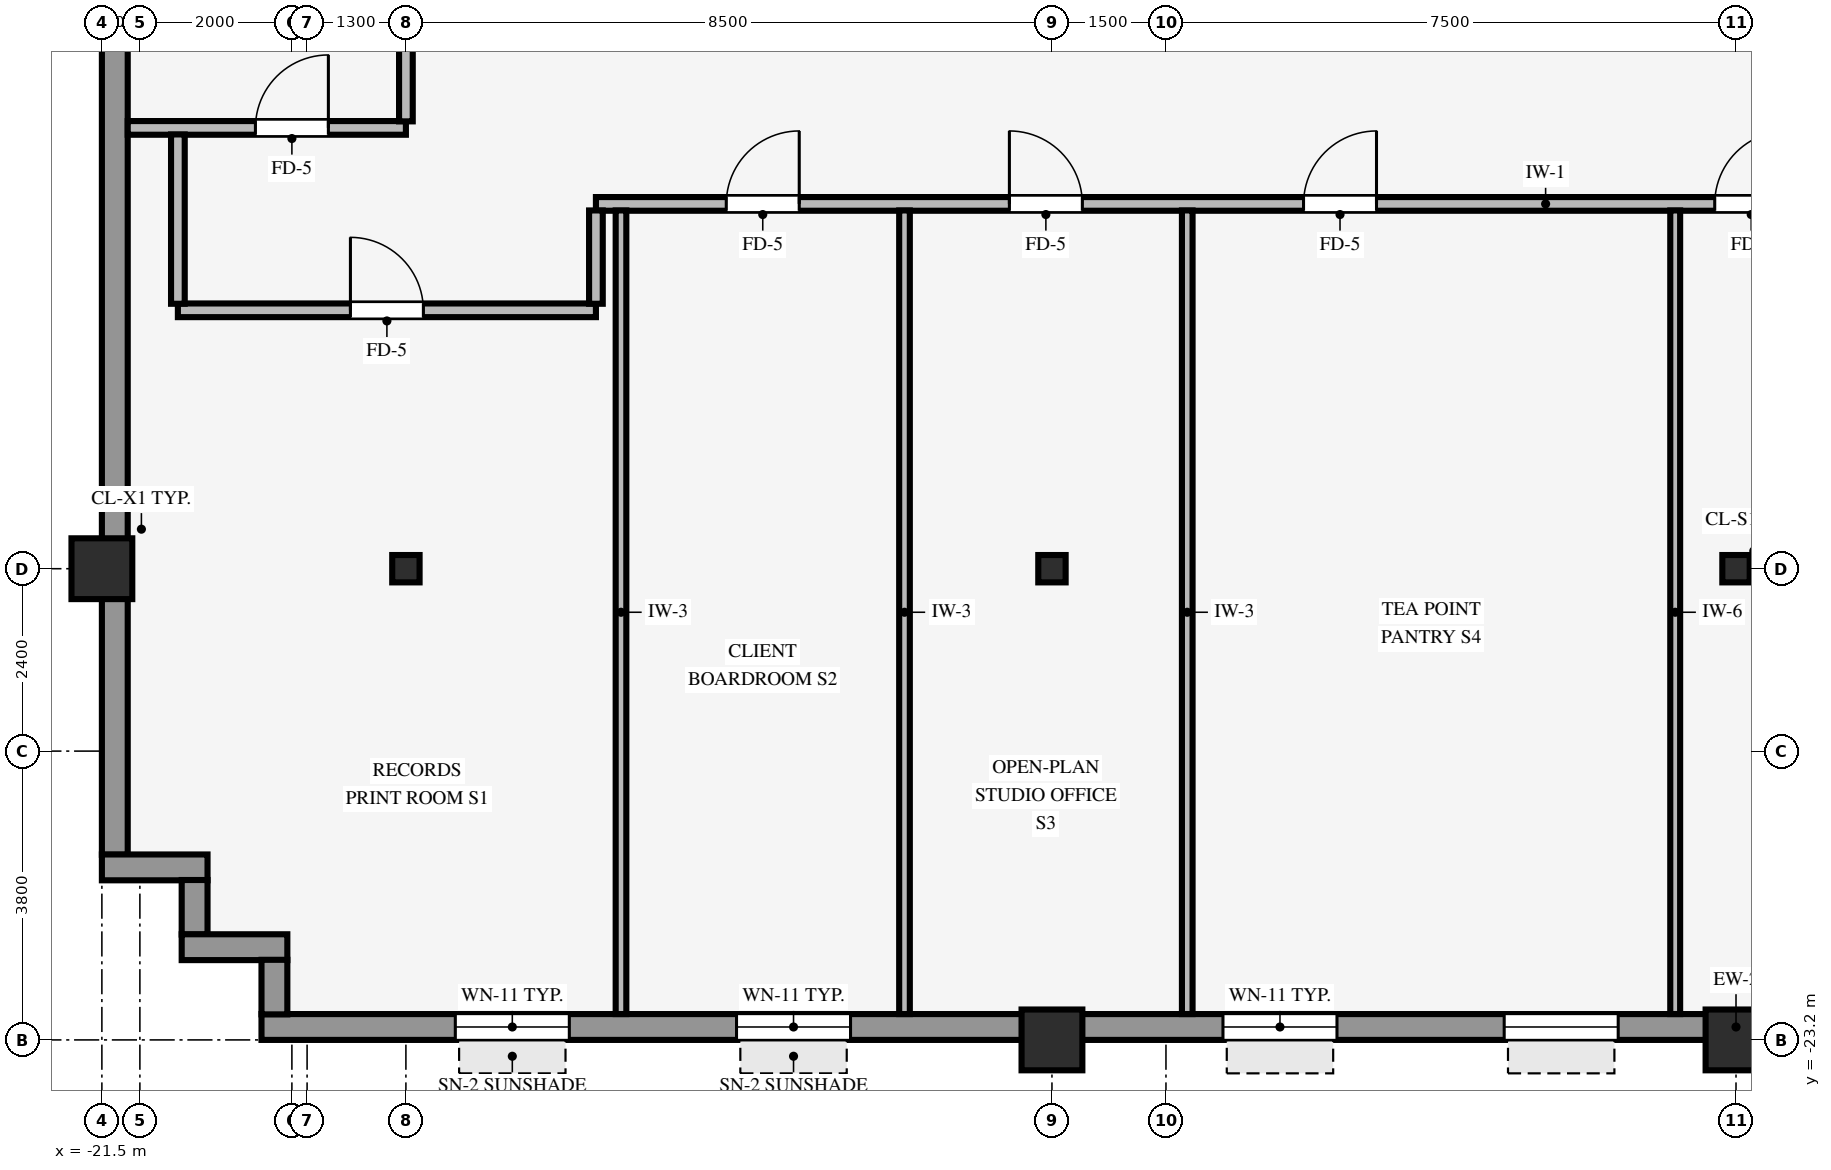
"""IFC4 building model, lengths in metres.
Left out: names, types, materials, properties, quantities, classifications, styles, units other than length and angle.
Written with IfcOpenShell. Run it as: python <this file> out.ifc"""

import sys

from ifc_helpers import new_model, si_unit, direction, frame, frame_2d, origin, origin_2d, place, context, subcontext, project, spatial, rectangle, hollow_rectangle, i_section, extrude, source, transform, mapped, element, fill, save


model = new_model("IFC4")
c1 = context("Model", 3, precision=1e-05, world=origin(), true_north=direction((0.0, 1.0)))
c2 = subcontext(c1, "Body", "Model", "MODEL_VIEW")
j1 = project(units=[si_unit("LENGTHUNIT", "METRE"), si_unit("PLANEANGLEUNIT", "RADIAN")], contexts=[c1])
p1 = place(None, origin())
s1 = spatial("IfcSite", under=j1, at=p1, CompositionType="ELEMENT")
p2 = place(p1, origin())
s2 = spatial("IfcBuilding", under=s1, at=p2, CompositionType="ELEMENT")
p3 = place(p2, frame((0.0, 0.0, 64.1)))
s3 = spatial("IfcBuildingStorey", under=s2, at=p3, CompositionType="ELEMENT", Elevation=64.1)
for number, where, z_axis, x_axis in (
    (1, (-21.5, -17.0, 0.0), (0.0, 0.0, 1.0), (1.0, 0.0, 0.0)),
    (2, (-9.0, -23.2, 0.0), (0.0, 0.0, 1.0), (1.0, 0.0, 0.0)),
    (3, (0.0, -23.2, 0.0), (0.0, 0.0, 1.0), (1.0, 0.0, 0.0)),
):
    element("IfcColumn", number, at=place(p3, frame(where, z_axis=z_axis, x_axis=x_axis)), inside=s3, PredefinedType="COLUMN", context=c2, shape_type="SweptSolid", body=[
        extrude(hollow_rectangle(XDim=0.8, YDim=0.8, WallThickness=0.055, InnerFilletRadius=0.055, OuterFilletRadius=0.11, at=origin_2d()), origin(), (0.0, 0.0, 1.0), 3.37),
    ])
for number, where, z_axis, x_axis in (
    (4, (0.0, -17.0, 0.0), (0.0, 0.0, 1.0), (1.0, 0.0, 0.0)),
    (5, (-17.5, -17.0, 0.0), (0.0, 0.0, 1.0), (1.0, 0.0, 0.0)),
    (6, (-9.0, -17.0, 0.0), (0.0, 0.0, 1.0), (1.0, 0.0, 0.0)),
):
    element("IfcColumn", number, at=place(p3, frame(where, z_axis=z_axis, x_axis=x_axis)), inside=s3, PredefinedType="COLUMN", context=c2, shape_type="SweptSolid", body=[
        extrude(i_section(OverallWidth=0.36, OverallDepth=0.36, WebThickness=0.021, FlangeThickness=0.021, FilletRadius=0.018, at=origin_2d()), origin(), (0.0, 0.0, 1.0), 3.37),
    ])
p4 = place(p3, frame((-19.4, -23.03, 0.0), z_axis=(0.0, 0.0, 1.0), x_axis=(1.0, 0.0, 0.0)))
e7 = element("IfcWall", 7, at=p4, inside=s3, PredefinedType="STANDARD", context=c2, shape_type="SweptSolid", body=[
    extrude(rectangle(XDim=38.8, YDim=0.34, at=frame_2d((19.4, 0.0))), origin(), (0.0, 0.0, 1.0), 2.705),
])
p5 = place(p4, frame((2.55, 0.0, 0.8)))
e8 = element("IfcOpeningElement", 8, at=p5, cuts=e7, PredefinedType="OPENING", context=c2, shape_type="SweptSolid", body=[
    extrude(rectangle(XDim=1.5, YDim=1.6, at=frame_2d((0.75, 0.8))), frame((0.0, 0.18, 0.0), z_axis=(0.0, -1.0, 0.0), x_axis=(1.0, 0.0, 0.0)), (0.0, 0.0, 1.0), 0.36),
])
p6 = place(p4, frame((6.25, 0.0, 0.8)))
e9 = element("IfcOpeningElement", 9, at=p6, cuts=e7, PredefinedType="OPENING", context=c2, shape_type="SweptSolid", body=[
    extrude(rectangle(XDim=1.5, YDim=1.6, at=frame_2d((0.75, 0.8))), frame((0.0, 0.18, 0.0), z_axis=(0.0, -1.0, 0.0), x_axis=(1.0, 0.0, 0.0)), (0.0, 0.0, 1.0), 0.36),
])
p7 = place(p4, frame((12.65, 0.0, 0.8)))
e10 = element("IfcOpeningElement", 10, at=p7, cuts=e7, PredefinedType="OPENING", context=c2, shape_type="SweptSolid", body=[
    extrude(rectangle(XDim=1.5, YDim=1.6, at=frame_2d((0.75, 0.8))), frame((0.0, 0.18, 0.0), z_axis=(0.0, -1.0, 0.0), x_axis=(1.0, 0.0, 0.0)), (0.0, 0.0, 1.0), 0.36),
])
p8 = place(p4, frame((16.35, 0.0, 0.8)))
e11 = element("IfcOpeningElement", 11, at=p8, cuts=e7, PredefinedType="OPENING", context=c2, shape_type="SweptSolid", body=[
    extrude(rectangle(XDim=1.5, YDim=1.6, at=frame_2d((0.75, 0.8))), frame((0.0, 0.18, 0.0), z_axis=(0.0, -1.0, 0.0), x_axis=(1.0, 0.0, 0.0)), (0.0, 0.0, 1.0), 0.36),
])
p9 = place(p4, frame((20.95, 0.0, 0.8)))
e12 = element("IfcOpeningElement", 12, at=p9, cuts=e7, PredefinedType="OPENING", context=c2, shape_type="SweptSolid", body=[
    extrude(rectangle(XDim=1.5, YDim=1.6, at=frame_2d((0.75, 0.8))), frame((0.0, 0.18, 0.0), z_axis=(0.0, -1.0, 0.0), x_axis=(1.0, 0.0, 0.0)), (0.0, 0.0, 1.0), 0.36),
])
p10 = place(p4, frame((25.55, 0.0, 0.8)))
e13 = element("IfcOpeningElement", 13, at=p10, cuts=e7, PredefinedType="OPENING", context=c2, shape_type="SweptSolid", body=[
    extrude(rectangle(XDim=1.5, YDim=1.6, at=frame_2d((0.75, 0.8))), frame((0.0, 0.18, 0.0), z_axis=(0.0, -1.0, 0.0), x_axis=(1.0, 0.0, 0.0)), (0.0, 0.0, 1.0), 0.36),
])
p11 = place(p4, frame((30.15, 0.0, 0.8)))
e14 = element("IfcOpeningElement", 14, at=p11, cuts=e7, PredefinedType="OPENING", context=c2, shape_type="SweptSolid", body=[
    extrude(rectangle(XDim=1.5, YDim=1.6, at=frame_2d((0.75, 0.8))), frame((0.0, 0.18, 0.0), z_axis=(0.0, -1.0, 0.0), x_axis=(1.0, 0.0, 0.0)), (0.0, 0.0, 1.0), 0.36),
])
p12 = place(p4, frame((34.75, 0.0, 0.8)))
e15 = element("IfcOpeningElement", 15, at=p12, cuts=e7, PredefinedType="OPENING", context=c2, shape_type="SweptSolid", body=[
    extrude(rectangle(XDim=1.5, YDim=1.6, at=frame_2d((0.75, 0.8))), frame((0.0, 0.18, 0.0), z_axis=(0.0, -1.0, 0.0), x_axis=(1.0, 0.0, 0.0)), (0.0, 0.0, 1.0), 0.36),
])
p13 = place(p3, frame((-21.33, -20.764, 0.0), z_axis=(0.0, 0.0, 1.0), x_axis=(0.0, 1.0, 0.0)))
e16 = element("IfcWall", 16, at=p13, inside=s3, PredefinedType="STANDARD", context=c2, shape_type="SweptSolid", body=[
    extrude(rectangle(XDim=41.528, YDim=0.34, at=frame_2d((20.764, 0.0))), origin(), (0.0, 0.0, 1.0), 2.705),
])
p14 = place(p13, frame((15.364, 0.0, 0.0)))
e17 = element("IfcOpeningElement", 17, at=p14, cuts=e16, PredefinedType="OPENING", context=c2, shape_type="SweptSolid", body=[
    extrude(rectangle(XDim=1.05, YDim=2.1, at=frame_2d((0.525, 1.05))), frame((0.0, 0.18, 0.0), z_axis=(0.0, -1.0, 0.0), x_axis=(1.0, 0.0, 0.0)), (0.0, 0.0, 1.0), 0.36),
])
p15 = place(p13, frame((12.202, 0.0, 0.8)))
e18 = element("IfcOpeningElement", 18, at=p15, cuts=e16, PredefinedType="OPENING", context=c2, shape_type="SweptSolid", body=[
    extrude(rectangle(XDim=2.3, YDim=1.62, at=frame_2d((1.15, 0.81))), frame((0.0, 0.18, 0.0), z_axis=(0.0, -1.0, 0.0), x_axis=(1.0, 0.0, 0.0)), (0.0, 0.0, 1.0), 0.36),
])
p16 = place(p13, frame((17.144, 0.0, 0.8)))
e19 = element("IfcOpeningElement", 19, at=p16, cuts=e16, PredefinedType="OPENING", context=c2, shape_type="SweptSolid", body=[
    extrude(rectangle(XDim=2.3, YDim=1.62, at=frame_2d((1.15, 0.81))), frame((0.0, 0.18, 0.0), z_axis=(0.0, -1.0, 0.0), x_axis=(1.0, 0.0, 0.0)), (0.0, 0.0, 1.0), 0.36),
])
p17 = place(p13, frame((27.025, 0.0, 0.8)))
e20 = element("IfcOpeningElement", 20, at=p17, cuts=e16, PredefinedType="OPENING", context=c2, shape_type="SweptSolid", body=[
    extrude(rectangle(XDim=2.3, YDim=1.62, at=frame_2d((1.15, 0.81))), frame((0.0, 0.18, 0.0), z_axis=(0.0, -1.0, 0.0), x_axis=(1.0, 0.0, 0.0)), (0.0, 0.0, 1.0), 0.36),
])
p18 = place(p3, frame((-21.5, -20.93, 0.0), z_axis=(0.0, 0.0, 1.0), x_axis=(1.0, 0.0, 0.0)))
e21 = element("IfcWall", 21, at=p18, inside=s3, PredefinedType="STANDARD", context=c2, shape_type="SweptSolid", body=[
    extrude(rectangle(XDim=1.39, YDim=0.34, at=frame_2d((0.695, 0.0))), origin(), (0.0, 0.0, 1.0), 3.36),
])
p19 = place(p3, frame((-20.28, -21.814, 0.0), z_axis=(0.0, 0.0, 1.0), x_axis=(0.0, 1.0, 0.0)))
e22 = element("IfcWall", 22, at=p19, inside=s3, PredefinedType="STANDARD", context=c2, shape_type="SweptSolid", body=[
    extrude(rectangle(XDim=0.718, YDim=0.34, at=frame_2d((0.359, 0.0))), origin(), (0.0, 0.0, 1.0), 3.36),
])
p20 = place(p3, frame((-20.45, -21.98, 0.0), z_axis=(0.0, 0.0, 1.0), x_axis=(1.0, 0.0, 0.0)))
e23 = element("IfcWall", 23, at=p20, inside=s3, PredefinedType="STANDARD", context=c2, shape_type="SweptSolid", body=[
    extrude(rectangle(XDim=1.39, YDim=0.34, at=frame_2d((0.695, 0.0))), origin(), (0.0, 0.0, 1.0), 3.36),
])
p21 = place(p3, frame((-19.23, -22.864, 0.0), z_axis=(0.0, 0.0, 1.0), x_axis=(0.0, 1.0, 0.0)))
e24 = element("IfcWall", 24, at=p21, inside=s3, PredefinedType="STANDARD", context=c2, shape_type="SweptSolid", body=[
    extrude(rectangle(XDim=0.718, YDim=0.34, at=frame_2d((0.359, 0.0))), origin(), (0.0, 0.0, 1.0), 3.36),
])
p22 = place(p3, frame((-20.5, -13.6, 0.0), z_axis=(0.0, 0.0, 1.0), x_axis=(1.0, 0.0, 0.0)))
e25 = element("IfcWall", 25, at=p22, inside=s3, PredefinedType="PARTITIONING", context=c2, shape_type="SweptSolid", body=[
    extrude(rectangle(XDim=5.5, YDim=0.18, at=frame_2d((2.75, 0.0))), origin(), (0.0, 0.0, 1.0), 2.942),
])
p23 = place(p22, frame((2.27, 0.0, 0.0)))
e26 = element("IfcOpeningElement", 26, at=p23, cuts=e25, PredefinedType="OPENING", context=c2, shape_type="SweptSolid", body=[
    extrude(rectangle(XDim=0.96, YDim=2.1, at=frame_2d((0.48, 1.05))), frame((0.0, 0.1, 0.0), z_axis=(0.0, -1.0, 0.0), x_axis=(1.0, 0.0, 0.0)), (0.0, 0.0, 1.0), 0.2),
])
p24 = place(p3, frame((-15.0, -12.2, 0.0), z_axis=(0.0, 0.0, 1.0), x_axis=(1.0, 0.0, 0.0)))
e27 = element("IfcWall", 27, at=p24, inside=s3, PredefinedType="PARTITIONING", context=c2, shape_type="SweptSolid", body=[
    extrude(rectangle(XDim=23.8, YDim=0.18, at=frame_2d((11.9, 0.0))), origin(), (0.0, 0.0, 1.0), 3.36),
])
p25 = place(p24, frame((9.31, 0.0, 0.0)))
e28 = element("IfcOpeningElement", 28, at=p25, cuts=e27, PredefinedType="OPENING", context=c2, shape_type="SweptSolid", body=[
    extrude(rectangle(XDim=0.96, YDim=2.1, at=frame_2d((0.48, 1.05))), frame((0.0, 0.1, 0.0), z_axis=(0.0, -1.0, 0.0), x_axis=(1.0, 0.0, 0.0)), (0.0, 0.0, 1.0), 0.2),
])
p26 = place(p24, frame((1.715, 0.0, 0.0)))
e29 = element("IfcOpeningElement", 29, at=p26, cuts=e27, PredefinedType="OPENING", context=c2, shape_type="SweptSolid", body=[
    extrude(rectangle(XDim=0.96, YDim=2.1, at=frame_2d((0.48, 1.05))), frame((0.0, 0.1, 0.0), z_axis=(0.0, -1.0, 0.0), x_axis=(1.0, 0.0, 0.0)), (0.0, 0.0, 1.0), 0.2),
])
p27 = place(p24, frame((5.44, 0.0, 0.0)))
e30 = element("IfcOpeningElement", 30, at=p27, cuts=e27, PredefinedType="OPENING", context=c2, shape_type="SweptSolid", body=[
    extrude(rectangle(XDim=0.96, YDim=2.1, at=frame_2d((0.48, 1.05))), frame((0.0, 0.1, 0.0), z_axis=(0.0, -1.0, 0.0), x_axis=(1.0, 0.0, 0.0)), (0.0, 0.0, 1.0), 0.2),
])
p28 = place(p24, frame((19.65, 0.0, 0.0)))
e31 = element("IfcOpeningElement", 31, at=p28, cuts=e27, PredefinedType="OPENING", context=c2, shape_type="SweptSolid", body=[
    extrude(rectangle(XDim=0.9, YDim=2.1, at=frame_2d((0.45, 1.05))), frame((0.0, 0.1, 0.0), z_axis=(0.0, -1.0, 0.0), x_axis=(1.0, 0.0, 0.0)), (0.0, 0.0, 1.0), 0.2),
])
p29 = place(p24, frame((17.05, 0.0, 0.0)))
e32 = element("IfcOpeningElement", 32, at=p29, cuts=e27, PredefinedType="OPENING", context=c2, shape_type="SweptSolid", body=[
    extrude(rectangle(XDim=0.9, YDim=2.1, at=frame_2d((0.45, 1.05))), frame((0.0, 0.1, 0.0), z_axis=(0.0, -1.0, 0.0), x_axis=(1.0, 0.0, 0.0)), (0.0, 0.0, 1.0), 0.2),
])
p30 = place(p24, frame((22.15, 0.0, 0.0)))
e33 = element("IfcOpeningElement", 33, at=p30, cuts=e27, PredefinedType="OPENING", context=c2, shape_type="SweptSolid", body=[
    extrude(rectangle(XDim=0.9, YDim=2.1, at=frame_2d((0.45, 1.05))), frame((0.0, 0.1, 0.0), z_axis=(0.0, -1.0, 0.0), x_axis=(1.0, 0.0, 0.0)), (0.0, 0.0, 1.0), 0.2),
])
p31 = place(p24, frame((14.72, 0.0, 0.0)))
e34 = element("IfcOpeningElement", 34, at=p31, cuts=e27, PredefinedType="OPENING", context=c2, shape_type="SweptSolid", body=[
    extrude(rectangle(XDim=0.96, YDim=2.1, at=frame_2d((0.48, 1.05))), frame((0.0, 0.1, 0.0), z_axis=(0.0, -1.0, 0.0), x_axis=(1.0, 0.0, 0.0)), (0.0, 0.0, 1.0), 0.2),
])
p32 = place(p3, frame((-21.16, -11.2, 0.0), z_axis=(0.0, 0.0, 1.0), x_axis=(1.0, 0.0, 0.0)))
e35 = element("IfcWall", 35, at=p32, inside=s3, PredefinedType="PARTITIONING", context=c2, shape_type="SweptSolid", body=[
    extrude(rectangle(XDim=3.66, YDim=0.18, at=frame_2d((1.83, 0.0))), origin(), (0.0, 0.0, 1.0), 3.36),
])
p33 = place(p32, frame((1.68, 0.0, 0.0)))
e36 = element("IfcOpeningElement", 36, at=p33, cuts=e35, PredefinedType="OPENING", context=c2, shape_type="SweptSolid", body=[
    extrude(rectangle(XDim=0.96, YDim=2.1, at=frame_2d((0.48, 1.05))), frame((0.0, 0.1, 0.0), z_axis=(0.0, -1.0, 0.0), x_axis=(1.0, 0.0, 0.0)), (0.0, 0.0, 1.0), 0.2),
])
p34 = place(p3, frame((-20.5, -13.514, 0.0), z_axis=(0.0, 0.0, 1.0), x_axis=(0.0, 1.0, 0.0)))
e37 = element("IfcWall", 37, at=p34, inside=s3, PredefinedType="PARTITIONING", context=c2, shape_type="SweptSolid", body=[
    extrude(rectangle(XDim=2.228, YDim=0.18, at=frame_2d((1.114, 0.0))), origin(), (0.0, 0.0, 1.0), 3.36),
])
p35 = place(p3, frame((-17.5, -11.114, 0.0), z_axis=(0.0, 0.0, 1.0), x_axis=(0.0, 1.0, 0.0)))
e38 = element("IfcWall", 38, at=p35, inside=s3, PredefinedType="PARTITIONING", context=c2, shape_type="SweptSolid", body=[
    extrude(rectangle(XDim=0.968, YDim=0.18, at=frame_2d((0.484, 0.0))), origin(), (0.0, 0.0, 1.0), 2.738),
])
p36 = place(p3, frame((-15.0, -13.514, 0.0), z_axis=(0.0, 0.0, 1.0), x_axis=(0.0, 1.0, 0.0)))
e39 = element("IfcWall", 39, at=p36, inside=s3, PredefinedType="PARTITIONING", context=c2, shape_type="SweptSolid", body=[
    extrude(rectangle(XDim=1.228, YDim=0.18, at=frame_2d((0.614, 0.0))), origin(), (0.0, 0.0, 1.0), 3.36),
])
for number, where, z_axis, x_axis in (
    (40, (-14.67, -22.86, 0.0), (0.0, 0.0, 1.0), (0.0, 1.0, 0.0)),
    (41, (-10.94, -22.86, 0.0), (0.0, 0.0, 1.0), (0.0, 1.0, 0.0)),
    (42, (-7.22, -22.86, 0.0), (0.0, 0.0, 1.0), (0.0, 1.0, 0.0)),
):
    element("IfcWall", number, at=place(p3, frame(where, z_axis=z_axis, x_axis=x_axis)), inside=s3, PredefinedType="PARTITIONING", context=c2, shape_type="SweptSolid", body=[
        extrude(rectangle(XDim=10.574, YDim=0.14, at=frame_2d((5.287, 0.0))), origin(), (0.0, 0.0, 1.0), 3.36),
    ])
p37 = place(p3, frame((-0.8, -22.86, 0.0), z_axis=(0.0, 0.0, 1.0), x_axis=(0.0, 1.0, 0.0)))
e43 = element("IfcWall", 43, at=p37, inside=s3, PredefinedType="PARTITIONING", context=c2, shape_type="SweptSolid", body=[
    extrude(rectangle(XDim=10.574, YDim=0.13, at=frame_2d((5.287, 0.0))), origin(), (0.0, 0.0, 1.0), 3.36),
])
m1 = source(origin(), c2, "Body", "SweptSolid", [
    extrude(rectangle(XDim=1.5, YDim=1.6, at=frame_2d((0.75, 0.8))), frame((0.0, 0.03, 0.0), z_axis=(0.0, -1.0, 0.0), x_axis=(1.0, 0.0, 0.0)), (0.0, 0.0, 1.0), 0.06),
])
p38 = place(p5, origin())
e44 = element("IfcWindow", 44, at=p38, inside=s3, PartitioningType="SINGLE_PANEL", PredefinedType="WINDOW", context=c2, shape_type="MappedRepresentation", body=[
    mapped(m1, transform((0.0, 0.0, 0.0), scale=1.0)),
])
fill(e8, e44)
p39 = place(p6, origin())
e45 = element("IfcWindow", 45, at=p39, inside=s3, PartitioningType="SINGLE_PANEL", PredefinedType="WINDOW", context=c2, shape_type="MappedRepresentation", body=[
    mapped(m1, transform((0.0, 0.0, 0.0), scale=1.0)),
])
fill(e9, e45)
p40 = place(p7, origin())
e46 = element("IfcWindow", 46, at=p40, inside=s3, PartitioningType="SINGLE_PANEL", PredefinedType="WINDOW", context=c2, shape_type="MappedRepresentation", body=[
    mapped(m1, transform((0.0, 0.0, 0.0), scale=1.0)),
])
fill(e10, e46)
p41 = place(p8, origin())
e47 = element("IfcWindow", 47, at=p41, inside=s3, PartitioningType="SINGLE_PANEL", PredefinedType="WINDOW", context=c2, shape_type="MappedRepresentation", body=[
    mapped(m1, transform((0.0, 0.0, 0.0), scale=1.0)),
])
fill(e11, e47)
m2 = source(origin(), c2, "Body", "SweptSolid", [
    extrude(rectangle(XDim=0.96, YDim=2.1, at=frame_2d((0.48, 1.05))), frame((0.0, 0.025, 0.0), z_axis=(0.0, -1.0, 0.0), x_axis=(1.0, 0.0, 0.0)), (0.0, 0.0, 1.0), 0.05),
])
p42 = place(p23, origin())
e48 = element("IfcDoor", 48, at=p42, inside=s3, OperationType="SINGLE_SWING_LEFT", PredefinedType="DOOR", context=c2, shape_type="MappedRepresentation", body=[
    mapped(m2, transform((0.0, 0.0, 0.0), scale=1.0)),
])
fill(e26, e48)
p43 = place(p25, origin())
e49 = element("IfcDoor", 49, at=p43, inside=s3, OperationType="SINGLE_SWING_RIGHT", PredefinedType="DOOR", context=c2, shape_type="MappedRepresentation", body=[
    mapped(m2, transform((0.0, 0.0, 0.0), scale=1.0)),
])
fill(e28, e49)
p44 = place(p26, origin())
e50 = element("IfcDoor", 50, at=p44, inside=s3, OperationType="SINGLE_SWING_RIGHT", PredefinedType="DOOR", context=c2, shape_type="MappedRepresentation", body=[
    mapped(m2, transform((0.0, 0.0, 0.0), scale=1.0)),
])
fill(e29, e50)
p45 = place(p27, origin())
e51 = element("IfcDoor", 51, at=p45, inside=s3, OperationType="SINGLE_SWING_LEFT", PredefinedType="DOOR", context=c2, shape_type="MappedRepresentation", body=[
    mapped(m2, transform((0.0, 0.0, 0.0), scale=1.0)),
])
fill(e30, e51)
p46 = place(p33, origin())
e52 = element("IfcDoor", 52, at=p46, inside=s3, OperationType="SINGLE_SWING_RIGHT", PredefinedType="DOOR", context=c2, shape_type="MappedRepresentation", body=[
    mapped(m2, transform((0.0, 0.0, 0.0), scale=1.0)),
])
fill(e36, e52)
p47 = place(p31, origin())
e53 = element("IfcDoor", 53, at=p47, inside=s3, OperationType="SINGLE_SWING_RIGHT", PredefinedType="DOOR", context=c2, shape_type="MappedRepresentation", body=[
    mapped(m2, transform((0.0, 0.0, 0.0), scale=1.0)),
])
fill(e34, e53)
save(model, sys.argv[1])
